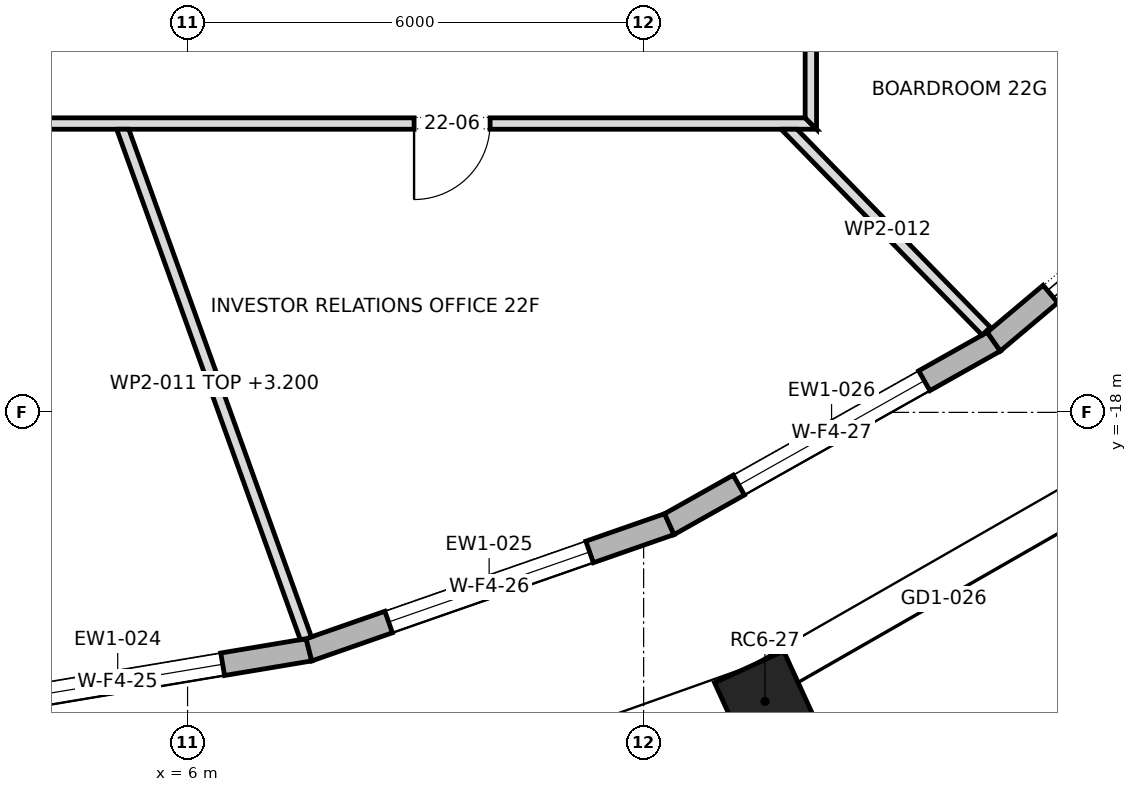
"""IFC4 building model, lengths in metres.
Left out: names, types, materials, properties, quantities, classifications, styles, units other than length and angle.
Written with IfcOpenShell. Run it as: python <this file> out.ifc"""

import sys

from ifc_helpers import new_model, si_unit, direction, frame, frame_2d, origin, origin_2d, place, context, subcontext, project, spatial, polyline, rectangle, outline, extrude, element, fill, save


model = new_model("IFC4")
c1 = context("Model", 3, precision=1e-05, world=origin(), true_north=direction((0.0, 1.0)))
c2 = subcontext(c1, "Body", "Model", "MODEL_VIEW")
j1 = project(units=[si_unit("LENGTHUNIT", "METRE"), si_unit("PLANEANGLEUNIT", "RADIAN")], contexts=[c1])
p1 = place(None, origin())
s1 = spatial("IfcSite", under=j1, at=p1, CompositionType="ELEMENT")
p2 = place(p1, origin())
s2 = spatial("IfcBuilding", under=s1, at=p2, CompositionType="ELEMENT")
p3 = place(p2, frame((0.0, 0.0, 304.3)))
s3 = spatial("IfcBuildingStorey", under=s2, at=p3, CompositionType="ELEMENT", Elevation=304.3)
p4 = place(p3, frame((13.596, -21.803, 0.0), z_axis=(0.0, 0.0, 1.0), x_axis=(0.909126368869, 0.416520402174, 0.0)))
e1 = element("IfcColumn", 1, at=p4, inside=s3, PredefinedType="COLUMN", context=c2, shape_type="SweptSolid", body=[
    extrude(rectangle(XDim=1.0, YDim=1.0, at=origin_2d()), origin(), (0.0, 0.0, 1.0), 4.0),
])
p5 = place(p3, frame((2.565, -21.966, 0.0), z_axis=(0.0, 0.0, 1.0), x_axis=(0.986269480969, 0.165143909695, 0.0)))
e2 = element("IfcWall", 2, at=p5, inside=s3, PredefinedType="STANDARD", context=c2, shape_type="SweptSolid", body=[
    extrude(outline(polyline([(-0.012, -0.15), (5.115, -0.15), (5.089, 0.15), (0.012, 0.15), (-0.012, -0.15)])), origin(), (0.0, 0.0, 1.0), 3.7),
])
p6 = place(p5, frame((1.151, 0.0, 0.6)))
e3 = element("IfcOpeningElement", 3, at=p6, cuts=e2, PredefinedType="OPENING", context=c2, shape_type="SweptSolid", body=[
    extrude(rectangle(XDim=2.8, YDim=2.65, at=frame_2d((1.4, 1.325))), frame((0.0, 0.162, 0.0), z_axis=(0.0, -1.0, 0.0), x_axis=(1.0, 0.0, 0.0)), (0.0, 0.0, 1.0), 0.324),
])
p7 = place(p3, frame((7.597, -21.124, 0.0), z_axis=(0.0, 0.0, 1.0), x_axis=(0.944251863618, 0.329223963365, 0.0)))
e4 = element("IfcWall", 4, at=p7, inside=s3, PredefinedType="STANDARD", context=c2, shape_type="SweptSolid", body=[
    extrude(outline(polyline([(-0.013, -0.15), (5.034, -0.15), (5.008, 0.15), (0.013, 0.15), (-0.013, -0.15)])), origin(), (0.0, 0.0, 1.0), 3.7),
])
p8 = place(p7, frame((1.111, 0.0, 0.6)))
e5 = element("IfcOpeningElement", 5, at=p8, cuts=e4, PredefinedType="OPENING", context=c2, shape_type="SweptSolid", body=[
    extrude(rectangle(XDim=2.8, YDim=2.65, at=frame_2d((1.4, 1.325))), frame((0.0, 0.162, 0.0), z_axis=(0.0, -1.0, 0.0), x_axis=(1.0, 0.0, 0.0)), (0.0, 0.0, 1.0), 0.324),
])
p9 = place(p3, frame((12.338, -19.471, 0.0), z_axis=(0.0, 0.0, 1.0), x_axis=(0.871570211895, 0.490270706588, 0.0)))
e6 = element("IfcWall", 6, at=p9, inside=s3, PredefinedType="STANDARD", context=c2, shape_type="SweptSolid", body=[
    extrude(outline(polyline([(-0.013, -0.15), (4.912, -0.15), (4.883, 0.15), (0.013, 0.15), (-0.013, -0.15)])), origin(), (0.0, 0.0, 1.0), 3.7),
])
p10 = place(p9, frame((1.049, 0.0, 0.6)))
e7 = element("IfcOpeningElement", 7, at=p10, cuts=e6, PredefinedType="OPENING", context=c2, shape_type="SweptSolid", body=[
    extrude(rectangle(XDim=2.8, YDim=2.65, at=frame_2d((1.4, 1.325))), frame((0.0, 0.162, 0.0), z_axis=(0.0, -1.0, 0.0), x_axis=(1.0, 0.0, 0.0)), (0.0, 0.0, 1.0), 0.324),
])
p11 = place(p3, frame((16.607, -17.07, 0.0), z_axis=(0.0, 0.0, 1.0), x_axis=(0.765059193792, 0.643959959931, 0.0)))
e8 = element("IfcWall", 8, at=p11, inside=s3, PredefinedType="STANDARD", context=c2, shape_type="SweptSolid", body=[
    extrude(outline(polyline([(-0.014, -0.15), (4.763, -0.15), (4.733, 0.15), (0.014, 0.15), (-0.014, -0.15)])), origin(), (0.0, 0.0, 1.0), 3.7),
])
p12 = place(p11, frame((0.974, 0.0, 0.0)))
e9 = element("IfcOpeningElement", 9, at=p12, cuts=e8, PredefinedType="OPENING", context=c2, shape_type="SweptSolid", body=[
    extrude(rectangle(XDim=2.8, YDim=3.25, at=frame_2d((1.4, 1.625))), frame((0.0, 0.162, 0.0), z_axis=(0.0, -1.0, 0.0), x_axis=(1.0, 0.0, 0.0)), (0.0, 0.0, 1.0), 0.324),
])
p13 = place(p3, frame((-14.275, -14.2, 0.0), z_axis=(0.0, 0.0, 1.0), x_axis=(1.0, 0.0, 0.0)))
e10 = element("IfcWall", 10, at=p13, inside=s3, PredefinedType="PARTITIONING", context=c2, shape_type="SweptSolid", body=[
    extrude(outline(polyline([(28.55, -0.075), (28.55, -0.075), (28.4, 0.075), (26.517, 0.075), (24.633, 0.075), (22.75, 0.075), (20.866, 0.075), (18.983, 0.075), (17.1, 0.075), (15.217, 0.075), (13.333, 0.075), (11.45, 0.075), (9.567, 0.075), (7.683, 0.075), (5.8, 0.075), (3.917, 0.075), (2.033, 0.075), (0.15, 0.075), (0.0, -0.075), (1.903, -0.075), (3.807, -0.075), (5.71, -0.075), (7.613, -0.075), (9.517, -0.075), (11.42, -0.075), (13.323, -0.075), (15.227, -0.075), (17.13, -0.075), (19.033, -0.075), (20.937, -0.075), (22.84, -0.075), (24.743, -0.075), (26.646, -0.075), (28.55, -0.075)])), origin(), (0.0, 0.0, 1.0), 3.7),
])
p14 = place(p13, frame((2.165, 0.0, 0.0)))
e11 = element("IfcOpeningElement", 11, at=p14, cuts=e10, PredefinedType="OPENING", context=c2, shape_type="SweptSolid", body=[
    extrude(rectangle(XDim=1.0, YDim=2.1, at=frame_2d((0.5, 1.05))), frame((0.0, 0.087, 0.0), z_axis=(0.0, -1.0, 0.0), x_axis=(1.0, 0.0, 0.0)), (0.0, 0.0, 1.0), 0.174),
])
p15 = place(p13, frame((11.825, 0.0, 0.0)))
e12 = element("IfcOpeningElement", 12, at=p15, cuts=e10, PredefinedType="OPENING", context=c2, shape_type="SweptSolid", body=[
    extrude(rectangle(XDim=1.0, YDim=2.1, at=frame_2d((0.5, 1.05))), frame((0.0, 0.087, 0.0), z_axis=(0.0, -1.0, 0.0), x_axis=(1.0, 0.0, 0.0)), (0.0, 0.0, 1.0), 0.174),
])
p16 = place(p13, frame((23.255, 0.0, 0.0)))
e13 = element("IfcOpeningElement", 13, at=p16, cuts=e10, PredefinedType="OPENING", context=c2, shape_type="SweptSolid", body=[
    extrude(rectangle(XDim=1.0, YDim=2.1, at=frame_2d((0.5, 1.05))), frame((0.0, 0.087, 0.0), z_axis=(0.0, -1.0, 0.0), x_axis=(1.0, 0.0, 0.0)), (0.0, 0.0, 1.0), 0.174),
])
p17 = place(p3, frame((5.138, -14.25, 0.0), z_axis=(0.0, 0.0, 1.0), x_axis=(0.338519975389, -0.940959205419, 0.0)))
e14 = element("IfcWall", 14, at=p17, inside=s3, PredefinedType="PARTITIONING", context=c2, shape_type="SweptSolid", body=[
    extrude(outline(polyline([(0.0, -0.075), (1.784, -0.075), (3.568, -0.075), (5.353, -0.075), (7.137, -0.075), (7.15, 0.001), (7.151, 0.019), (7.151, 0.075), (5.376, 0.075), (3.602, 0.075), (1.828, 0.075), (0.053, 0.075), (0.0, -0.074), (0.0, -0.075)])), origin(), (0.0, 0.0, 1.0), 3.2),
])
p18 = place(p3, frame((13.862, -14.223, 0.0), z_axis=(0.0, 0.0, 1.0), x_axis=(0.698607487782, -0.715505120887, 0.0)))
e15 = element("IfcWall", 15, at=p18, inside=s3, PredefinedType="PARTITIONING", context=c2, shape_type="SweptSolid", body=[
    extrude(outline(polyline([(3.785, 0.075), (1.966, 0.075), (0.146, 0.075), (0.0, -0.074), (0.0, -0.075), (1.893, -0.075), (3.785, -0.075), (3.785, 0.075)])), origin(), (0.0, 0.0, 1.0), 3.7),
])
p19 = place(p3, frame((14.2, -14.275, 0.0), z_axis=(0.0, 0.0, 1.0), x_axis=(0.0, 1.0, 0.0)))
e16 = element("IfcWall", 16, at=p19, inside=s3, PredefinedType="PARTITIONING", context=c2, shape_type="SweptSolid", body=[
    extrude(outline(polyline([(28.55, -0.075), (28.55, -0.075), (28.4, 0.075), (26.517, 0.075), (24.633, 0.075), (22.75, 0.075), (20.866, 0.075), (18.983, 0.075), (17.1, 0.075), (15.217, 0.075), (13.333, 0.075), (11.45, 0.075), (9.567, 0.075), (7.683, 0.075), (5.8, 0.075), (3.917, 0.075), (2.033, 0.075), (0.15, 0.075), (0.0, -0.075), (1.903, -0.075), (3.807, -0.075), (5.71, -0.075), (7.613, -0.075), (9.517, -0.075), (11.42, -0.075), (13.323, -0.075), (15.227, -0.075), (17.13, -0.075), (19.033, -0.075), (20.937, -0.075), (22.84, -0.075), (24.743, -0.075), (26.646, -0.075), (28.55, -0.075)])), origin(), (0.0, 0.0, 1.0), 3.7),
])
p20 = place(p19, frame((3.48, 0.0, 0.0)))
e17 = element("IfcOpeningElement", 17, at=p20, cuts=e16, PredefinedType="OPENING", context=c2, shape_type="SweptSolid", body=[
    extrude(rectangle(XDim=1.0, YDim=2.1, at=frame_2d((0.5, 1.05))), frame((0.0, 0.087, 0.0), z_axis=(0.0, -1.0, 0.0), x_axis=(1.0, 0.0, 0.0)), (0.0, 0.0, 1.0), 0.174),
])
p21 = place(p19, frame((9.99, 0.0, 0.0)))
e18 = element("IfcOpeningElement", 18, at=p21, cuts=e16, PredefinedType="OPENING", context=c2, shape_type="SweptSolid", body=[
    extrude(rectangle(XDim=1.0, YDim=2.1, at=frame_2d((0.5, 1.05))), frame((0.0, 0.087, 0.0), z_axis=(0.0, -1.0, 0.0), x_axis=(1.0, 0.0, 0.0)), (0.0, 0.0, 1.0), 0.174),
])
p22 = place(p19, frame((15.0, 0.0, 0.0)))
e19 = element("IfcOpeningElement", 19, at=p22, cuts=e16, PredefinedType="OPENING", context=c2, shape_type="SweptSolid", body=[
    extrude(rectangle(XDim=1.0, YDim=2.1, at=frame_2d((0.5, 1.05))), frame((0.0, 0.087, 0.0), z_axis=(0.0, -1.0, 0.0), x_axis=(1.0, 0.0, 0.0)), (0.0, 0.0, 1.0), 0.174),
])
p23 = place(p19, frame((20.495, 0.0, 0.0)))
e20 = element("IfcOpeningElement", 20, at=p23, cuts=e16, PredefinedType="OPENING", context=c2, shape_type="SweptSolid", body=[
    extrude(rectangle(XDim=1.0, YDim=2.1, at=frame_2d((0.5, 1.05))), frame((0.0, 0.087, 0.0), z_axis=(0.0, -1.0, 0.0), x_axis=(1.0, 0.0, 0.0)), (0.0, 0.0, 1.0), 0.174),
])
p24 = place(p6, origin())
e21 = element("IfcWindow", 21, at=p24, inside=s3, PartitioningType="DOUBLE_PANEL_VERTICAL", PredefinedType="WINDOW", context=c2, shape_type="SweptSolid", body=[
    extrude(rectangle(XDim=2.8, YDim=2.65, at=frame_2d((1.4, 1.325))), frame((0.0, 0.03, 0.0), z_axis=(0.0, -1.0, 0.0), x_axis=(1.0, 0.0, 0.0)), (0.0, 0.0, 1.0), 0.06),
])
fill(e3, e21)
p25 = place(p8, origin())
e22 = element("IfcWindow", 22, at=p25, inside=s3, PartitioningType="DOUBLE_PANEL_VERTICAL", PredefinedType="WINDOW", context=c2, shape_type="SweptSolid", body=[
    extrude(rectangle(XDim=2.8, YDim=2.65, at=frame_2d((1.4, 1.325))), frame((0.0, 0.03, 0.0), z_axis=(0.0, -1.0, 0.0), x_axis=(1.0, 0.0, 0.0)), (0.0, 0.0, 1.0), 0.06),
])
fill(e5, e22)
p26 = place(p10, origin())
e23 = element("IfcWindow", 23, at=p26, inside=s3, PartitioningType="DOUBLE_PANEL_VERTICAL", PredefinedType="WINDOW", context=c2, shape_type="SweptSolid", body=[
    extrude(rectangle(XDim=2.8, YDim=2.65, at=frame_2d((1.4, 1.325))), frame((0.0, 0.03, 0.0), z_axis=(0.0, -1.0, 0.0), x_axis=(1.0, 0.0, 0.0)), (0.0, 0.0, 1.0), 0.06),
])
fill(e7, e23)
p27 = place(p12, origin())
e24 = element("IfcDoor", 24, at=p27, inside=s3, OperationType="DOUBLE_DOOR_SLIDING", PredefinedType="DOOR", context=c2, shape_type="SweptSolid", body=[
    extrude(rectangle(XDim=2.8, YDim=3.25, at=frame_2d((1.4, 1.625))), frame((0.0, 0.025, 0.0), z_axis=(0.0, -1.0, 0.0), x_axis=(1.0, 0.0, 0.0)), (0.0, 0.0, 1.0), 0.05),
])
fill(e9, e24)
p28 = place(p16, frame((1.0, 0.0, 0.0), z_axis=(0.0, 0.0, 1.0), x_axis=(-1.0, 0.0, 0.0)))
e25 = element("IfcDoor", 25, at=p28, inside=s3, OperationType="SINGLE_SWING_LEFT", PredefinedType="DOOR", context=c2, shape_type="SweptSolid", body=[
    extrude(rectangle(XDim=1.0, YDim=2.1, at=frame_2d((0.5, 1.05))), frame((0.0, 0.025, 0.0), z_axis=(0.0, -1.0, 0.0), x_axis=(1.0, 0.0, 0.0)), (0.0, 0.0, 1.0), 0.05),
])
fill(e13, e25)
save(model, sys.argv[1])
